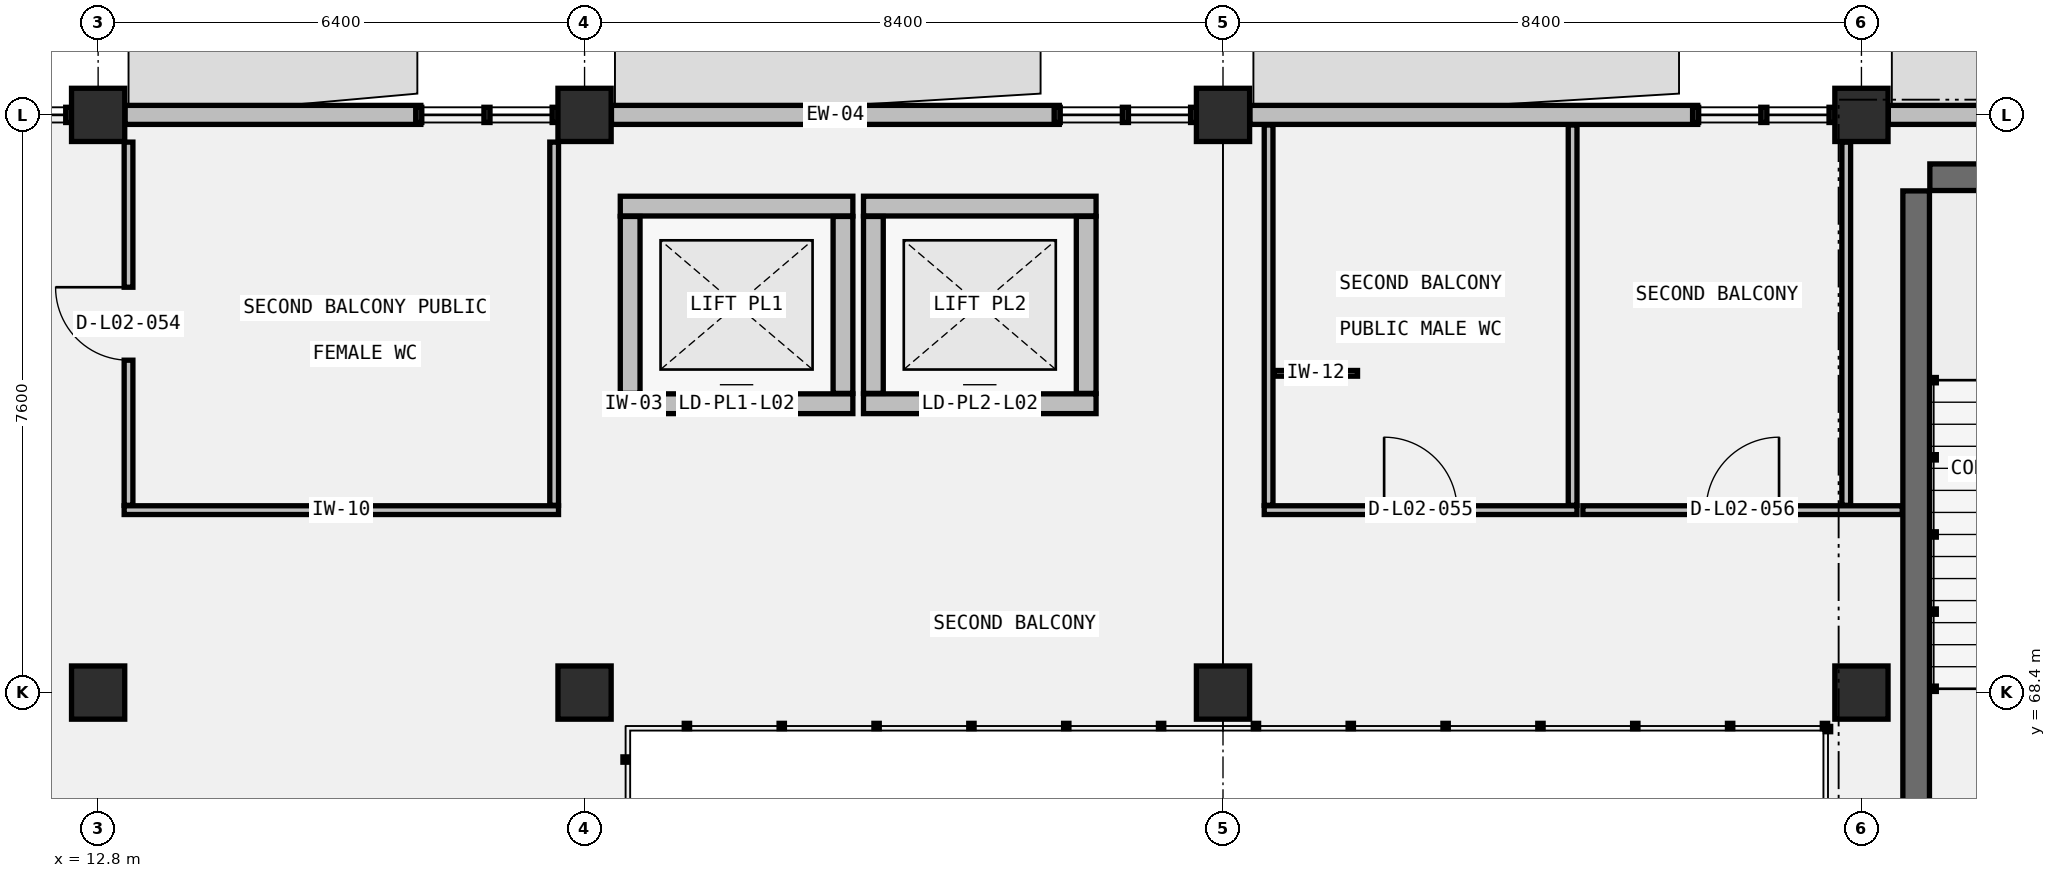
"""IFC4 building model, lengths in metres.
Left out: names, types, materials, properties, quantities, classifications, styles, units other than length and angle.
Written with IfcOpenShell. Run it as: python <this file> out.ifc"""

import sys

from ifc_helpers import new_model, si_unit, direction, frame, frame_2d, origin, origin_2d, place, context, subcontext, project, spatial, rectangle, circle, extrude, element, fill, save


model = new_model("IFC4")
c1 = context("Model", 3, precision=1e-05, world=origin(), true_north=direction((0.0, 1.0)))
c2 = subcontext(c1, "Body", "Model", "MODEL_VIEW")
j1 = project(units=[si_unit("LENGTHUNIT", "METRE"), si_unit("PLANEANGLEUNIT", "RADIAN")], contexts=[c1])
p1 = place(None, origin())
s1 = spatial("IfcSite", under=j1, at=p1, CompositionType="ELEMENT")
p2 = place(p1, origin())
s2 = spatial("IfcBuilding", under=s1, at=p2, CompositionType="ELEMENT")
p3 = place(p2, frame((0.0, 0.0, 10.0)))
s3 = spatial("IfcBuildingStorey", under=s2, at=p3, CompositionType="ELEMENT", Elevation=10.0)
for number, where, z_axis, x_axis in (
    (1, (12.8, 68.4, 0.0), (0.0, 0.0, 1.0), (1.0, 0.0, 0.0)),
    (2, (12.8, 76.0, 0.0), (0.0, 0.0, 1.0), (1.0, 0.0, 0.0)),
    (3, (19.2, 68.4, 0.0), (0.0, 0.0, 1.0), (1.0, 0.0, 0.0)),
    (4, (19.2, 76.0, 0.0), (0.0, 0.0, 1.0), (1.0, 0.0, 0.0)),
    (5, (27.6, 68.4, 0.0), (0.0, 0.0, 1.0), (1.0, 0.0, 0.0)),
    (6, (27.6, 76.0, 0.0), (0.0, 0.0, 1.0), (1.0, 0.0, 0.0)),
    (7, (36.0, 68.4, 0.0), (0.0, 0.0, 1.0), (1.0, 0.0, 0.0)),
    (8, (36.0, 76.0, 0.0), (0.0, 0.0, 1.0), (1.0, 0.0, 0.0)),
):
    element("IfcColumn", number, at=place(p3, frame(where, z_axis=z_axis, x_axis=x_axis)), inside=s3, PredefinedType="COLUMN", context=c2, shape_type="SweptSolid", body=[
        extrude(circle(Radius=0.35, at=origin_2d()), origin(), (0.0, 0.0, 1.0), 4.6),
    ])
p4 = place(p3, frame((40.2, 75.18, 0.0), z_axis=(0.0, 0.0, 1.0), x_axis=(-1.0, 0.0, 0.0)))
e9 = element("IfcWall", 9, at=p4, inside=s3, PredefinedType="SHEAR", context=c2, shape_type="SweptSolid", body=[
    extrude(rectangle(XDim=3.3, YDim=0.35, at=frame_2d((1.65, 0.0))), origin(), (0.0, 0.0, 1.0), 4.36),
])
p5 = place(p3, frame((36.72, 75.0, 0.0), z_axis=(0.0, 0.0, 1.0), x_axis=(0.0, -1.0, 0.0)))
e10 = element("IfcWall", 10, at=p5, inside=s3, PredefinedType="SHEAR", context=c2, shape_type="SweptSolid", body=[
    extrude(rectangle(XDim=8.15, YDim=0.35, at=frame_2d((4.075, 0.0))), origin(), (0.0, 0.0, 1.0), 4.36),
])
p6 = place(p3, frame((13.154, 76.0, 0.0), z_axis=(0.0, 0.0, 1.0), x_axis=(1.0, 0.0, 0.0)))
e11 = element("IfcWall", 11, at=p6, inside=s3, PredefinedType="STANDARD", context=c2, shape_type="SweptSolid", body=[
    extrude(rectangle(XDim=3.892, YDim=0.25, at=frame_2d((1.946, 0.0))), origin(), (0.0, 0.0, 1.0), 3.538),
])
p7 = place(p3, frame((19.554, 76.0, 0.0), z_axis=(0.0, 0.0, 1.0), x_axis=(1.0, 0.0, 0.0)))
e12 = element("IfcWall", 12, at=p7, inside=s3, PredefinedType="STANDARD", context=c2, shape_type="SweptSolid", body=[
    extrude(rectangle(XDim=5.892, YDim=0.25, at=frame_2d((2.946, 0.0))), origin(), (0.0, 0.0, 1.0), 3.538),
])
p8 = place(p3, frame((27.954, 76.0, 0.0), z_axis=(0.0, 0.0, 1.0), x_axis=(1.0, 0.0, 0.0)))
e13 = element("IfcWall", 13, at=p8, inside=s3, PredefinedType="STANDARD", context=c2, shape_type="SweptSolid", body=[
    extrude(rectangle(XDim=5.892, YDim=0.25, at=frame_2d((2.946, 0.0))), origin(), (0.0, 0.0, 1.0), 3.85),
])
p9 = place(p3, frame((36.354, 76.0, 0.0), z_axis=(0.0, 0.0, 1.0), x_axis=(1.0, 0.0, 0.0)))
e14 = element("IfcWall", 14, at=p9, inside=s3, PredefinedType="STANDARD", context=c2, shape_type="SweptSolid", body=[
    extrude(rectangle(XDim=5.842, YDim=0.25, at=frame_2d((2.921, 0.0))), origin(), (0.0, 0.0, 1.0), 3.85),
])
p10 = place(p3, frame((19.67, 72.2, 0.0), z_axis=(0.0, 0.0, 1.0), x_axis=(1.0, 0.0, 0.0)))
e15 = element("IfcWall", 15, at=p10, inside=s3, PredefinedType="STANDARD", context=c2, shape_type="SweptSolid", body=[
    extrude(rectangle(XDim=3.06, YDim=0.26, at=frame_2d((1.53, 0.0))), origin(), (0.0, 0.0, 1.0), 4.36),
])
p11 = place(p10, frame((0.955, 0.0, 0.0)))
e16 = element("IfcOpeningElement", 16, at=p11, cuts=e15, PredefinedType="OPENING", context=c2, shape_type="SweptSolid", body=[
    extrude(rectangle(XDim=1.15, YDim=2.15, at=frame_2d((0.575, 1.075))), frame((0.0, 0.14, 0.0), z_axis=(0.0, -1.0, 0.0), x_axis=(1.0, 0.0, 0.0)), (0.0, 0.0, 1.0), 0.28),
])
p12 = place(p3, frame((19.67, 74.8, 0.0), z_axis=(0.0, 0.0, 1.0), x_axis=(1.0, 0.0, 0.0)))
e17 = element("IfcWall", 17, at=p12, inside=s3, PredefinedType="STANDARD", context=c2, shape_type="SweptSolid", body=[
    extrude(rectangle(XDim=3.06, YDim=0.26, at=frame_2d((1.53, 0.0))), origin(), (0.0, 0.0, 1.0), 4.36),
])
for number, where, z_axis, x_axis in (
    (18, (19.8, 72.336, 0.0), (0.0, 0.0, 1.0), (0.0, 1.0, 0.0)),
    (19, (22.6, 72.336, 0.0), (0.0, 0.0, 1.0), (0.0, 1.0, 0.0)),
):
    element("IfcWall", number, at=place(p3, frame(where, z_axis=z_axis, x_axis=x_axis)), inside=s3, PredefinedType="STANDARD", context=c2, shape_type="SweptSolid", body=[
        extrude(rectangle(XDim=2.328, YDim=0.26, at=frame_2d((1.164, 0.0))), origin(), (0.0, 0.0, 1.0), 4.36),
    ])
p13 = place(p3, frame((22.87, 72.2, 0.0), z_axis=(0.0, 0.0, 1.0), x_axis=(1.0, 0.0, 0.0)))
e20 = element("IfcWall", 20, at=p13, inside=s3, PredefinedType="STANDARD", context=c2, shape_type="SweptSolid", body=[
    extrude(rectangle(XDim=3.06, YDim=0.26, at=frame_2d((1.53, 0.0))), origin(), (0.0, 0.0, 1.0), 4.36),
])
p14 = place(p13, frame((0.92, 0.0, 0.0)))
e21 = element("IfcOpeningElement", 21, at=p14, cuts=e20, PredefinedType="OPENING", context=c2, shape_type="SweptSolid", body=[
    extrude(rectangle(XDim=1.22, YDim=2.2, at=frame_2d((0.61, 1.1))), frame((0.0, 0.14, 0.0), z_axis=(0.0, -1.0, 0.0), x_axis=(1.0, 0.0, 0.0)), (0.0, 0.0, 1.0), 0.28),
])
p15 = place(p3, frame((22.87, 74.8, 0.0), z_axis=(0.0, 0.0, 1.0), x_axis=(1.0, 0.0, 0.0)))
e22 = element("IfcWall", 22, at=p15, inside=s3, PredefinedType="STANDARD", context=c2, shape_type="SweptSolid", body=[
    extrude(rectangle(XDim=3.06, YDim=0.26, at=frame_2d((1.53, 0.0))), origin(), (0.0, 0.0, 1.0), 4.36),
])
for number, where, z_axis, x_axis in (
    (23, (23.0, 72.336, 0.0), (0.0, 0.0, 1.0), (0.0, 1.0, 0.0)),
    (24, (25.8, 72.336, 0.0), (0.0, 0.0, 1.0), (0.0, 1.0, 0.0)),
):
    element("IfcWall", number, at=place(p3, frame(where, z_axis=z_axis, x_axis=x_axis)), inside=s3, PredefinedType="STANDARD", context=c2, shape_type="SweptSolid", body=[
        extrude(rectangle(XDim=2.328, YDim=0.26, at=frame_2d((1.164, 0.0))), origin(), (0.0, 0.0, 1.0), 4.36),
    ])
p16 = place(p3, frame((13.143, 70.8, 0.0), z_axis=(0.0, 0.0, 1.0), x_axis=(1.0, 0.0, 0.0)))
e25 = element("IfcWall", 25, at=p16, inside=s3, PredefinedType="PARTITIONING", context=c2, shape_type="SweptSolid", body=[
    extrude(rectangle(XDim=5.715, YDim=0.115, at=frame_2d((2.857, 0.0))), origin(), (0.0, 0.0, 1.0), 3.938),
])
p17 = place(p3, frame((13.2, 70.864, 0.0), z_axis=(0.0, 0.0, 1.0), x_axis=(0.0, 1.0, 0.0)))
e26 = element("IfcWall", 26, at=p17, inside=s3, PredefinedType="PARTITIONING", context=c2, shape_type="SweptSolid", body=[
    extrude(rectangle(XDim=4.779, YDim=0.115, at=frame_2d((2.389, 0.0))), origin(), (0.0, 0.0, 1.0), 4.36),
])
p18 = place(p17, frame((1.909, 0.0, 0.0)))
e27 = element("IfcOpeningElement", 27, at=p18, cuts=e26, PredefinedType="OPENING", context=c2, shape_type="SweptSolid", body=[
    extrude(rectangle(XDim=0.96, YDim=2.08, at=frame_2d((0.48, 1.04))), frame((0.0, 0.067, 0.0), z_axis=(0.0, -1.0, 0.0), x_axis=(1.0, 0.0, 0.0)), (0.0, 0.0, 1.0), 0.135),
])
p19 = place(p3, frame((18.8, 70.864, 0.0), z_axis=(0.0, 0.0, 1.0), x_axis=(0.0, 1.0, 0.0)))
e28 = element("IfcWall", 28, at=p19, inside=s3, PredefinedType="PARTITIONING", context=c2, shape_type="SweptSolid", body=[
    extrude(rectangle(XDim=4.779, YDim=0.115, at=frame_2d((2.389, 0.0))), origin(), (0.0, 0.0, 1.0), 4.36),
])
p20 = place(p3, frame((28.143, 70.8, 0.0), z_axis=(0.0, 0.0, 1.0), x_axis=(1.0, 0.0, 0.0)))
e29 = element("IfcWall", 29, at=p20, inside=s3, PredefinedType="PARTITIONING", context=c2, shape_type="SweptSolid", body=[
    extrude(rectangle(XDim=4.115, YDim=0.115, at=frame_2d((2.058, 0.0))), origin(), (0.0, 0.0, 1.0), 3.938),
])
p21 = place(p20, frame((1.577, 0.0, 0.0)))
e30 = element("IfcOpeningElement", 30, at=p21, cuts=e29, PredefinedType="OPENING", context=c2, shape_type="SweptSolid", body=[
    extrude(rectangle(XDim=0.96, YDim=2.08, at=frame_2d((0.48, 1.04))), frame((0.0, 0.067, 0.0), z_axis=(0.0, -1.0, 0.0), x_axis=(1.0, 0.0, 0.0)), (0.0, 0.0, 1.0), 0.135),
])
for number, where, z_axis, x_axis in (
    (31, (28.2, 70.864, 0.0), (0.0, 0.0, 1.0), (0.0, 1.0, 0.0)),
    (32, (32.2, 70.864, 0.0), (0.0, 0.0, 1.0), (0.0, 1.0, 0.0)),
):
    element("IfcWall", number, at=place(p3, frame(where, z_axis=z_axis, x_axis=x_axis)), inside=s3, PredefinedType="PARTITIONING", context=c2, shape_type="SweptSolid", body=[
        extrude(rectangle(XDim=5.003, YDim=0.115, at=frame_2d((2.502, 0.0))), origin(), (0.0, 0.0, 1.0), 3.85),
    ])
p22 = place(p3, frame((32.335, 70.8, 0.0), z_axis=(0.0, 0.0, 1.0), x_axis=(1.0, 0.0, 0.0)))
e33 = element("IfcWall", 33, at=p22, inside=s3, PredefinedType="PARTITIONING", context=c2, shape_type="SweptSolid", body=[
    extrude(rectangle(XDim=4.202, YDim=0.115, at=frame_2d((2.101, 0.0))), origin(), (0.0, 0.0, 1.0), 3.938),
])
p23 = place(p22, frame((1.621, 0.0, 0.0)))
e34 = element("IfcOpeningElement", 34, at=p23, cuts=e33, PredefinedType="OPENING", context=c2, shape_type="SweptSolid", body=[
    extrude(rectangle(XDim=0.96, YDim=2.08, at=frame_2d((0.48, 1.04))), frame((0.0, 0.067, 0.0), z_axis=(0.0, -1.0, 0.0), x_axis=(1.0, 0.0, 0.0)), (0.0, 0.0, 1.0), 0.135),
])
p24 = place(p3, frame((35.8, 70.864, 0.0), z_axis=(0.0, 0.0, 1.0), x_axis=(0.0, 1.0, 0.0)))
e35 = element("IfcWall", 35, at=p24, inside=s3, PredefinedType="PARTITIONING", context=c2, shape_type="SweptSolid", body=[
    extrude(rectangle(XDim=4.779, YDim=0.115, at=frame_2d((2.389, 0.0))), origin(), (0.0, 0.0, 1.0), 3.948),
])
p25 = place(p3, frame((28.27, 72.6, 0.0), z_axis=(0.0, 0.0, 1.0), x_axis=(1.0, 0.0, 0.0)))
e36 = element("IfcWall", 36, at=p25, inside=s3, PredefinedType="PARTITIONING", context=c2, shape_type="SweptSolid", body=[
    extrude(rectangle(XDim=1.1, YDim=0.075, at=frame_2d((0.55, 0.0))), origin(), (0.0, 0.0, 1.0), 2.05),
])
p26 = place(p11, origin())
e37 = element("IfcDoor", 37, at=p26, inside=s3, OperationType="SLIDING_TO_LEFT", PredefinedType="DOOR", context=c2, shape_type="SweptSolid", body=[
    extrude(rectangle(XDim=1.15, YDim=2.15, at=frame_2d((0.575, 1.075))), frame((0.0, 0.025, 0.0), z_axis=(0.0, -1.0, 0.0), x_axis=(1.0, 0.0, 0.0)), (0.0, 0.0, 1.0), 0.05),
])
fill(e16, e37)
p27 = place(p14, origin())
e38 = element("IfcDoor", 38, at=p27, inside=s3, OperationType="SLIDING_TO_RIGHT", PredefinedType="DOOR", context=c2, shape_type="SweptSolid", body=[
    extrude(rectangle(XDim=1.22, YDim=2.2, at=frame_2d((0.61, 1.1))), frame((0.0, 0.025, 0.0), z_axis=(0.0, -1.0, 0.0), x_axis=(1.0, 0.0, 0.0)), (0.0, 0.0, 1.0), 0.05),
])
fill(e21, e38)
p28 = place(p18, origin())
e39 = element("IfcDoor", 39, at=p28, inside=s3, OperationType="SINGLE_SWING_RIGHT", PredefinedType="DOOR", context=c2, shape_type="SweptSolid", body=[
    extrude(rectangle(XDim=0.96, YDim=2.08, at=frame_2d((0.48, 1.04))), frame((0.0, 0.025, 0.0), z_axis=(0.0, -1.0, 0.0), x_axis=(1.0, 0.0, 0.0)), (0.0, 0.0, 1.0), 0.05),
])
fill(e27, e39)
p29 = place(p21, origin())
e40 = element("IfcDoor", 40, at=p29, inside=s3, OperationType="SINGLE_SWING_LEFT", PredefinedType="DOOR", context=c2, shape_type="SweptSolid", body=[
    extrude(rectangle(XDim=0.96, YDim=2.08, at=frame_2d((0.48, 1.04))), frame((0.0, 0.025, 0.0), z_axis=(0.0, -1.0, 0.0), x_axis=(1.0, 0.0, 0.0)), (0.0, 0.0, 1.0), 0.05),
])
fill(e30, e40)
p30 = place(p23, origin())
e41 = element("IfcDoor", 41, at=p30, inside=s3, OperationType="SINGLE_SWING_RIGHT", PredefinedType="DOOR", context=c2, shape_type="SweptSolid", body=[
    extrude(rectangle(XDim=0.96, YDim=2.08, at=frame_2d((0.48, 1.04))), frame((0.0, 0.025, 0.0), z_axis=(0.0, -1.0, 0.0), x_axis=(1.0, 0.0, 0.0)), (0.0, 0.0, 1.0), 0.05),
])
fill(e34, e41)
save(model, sys.argv[1])
